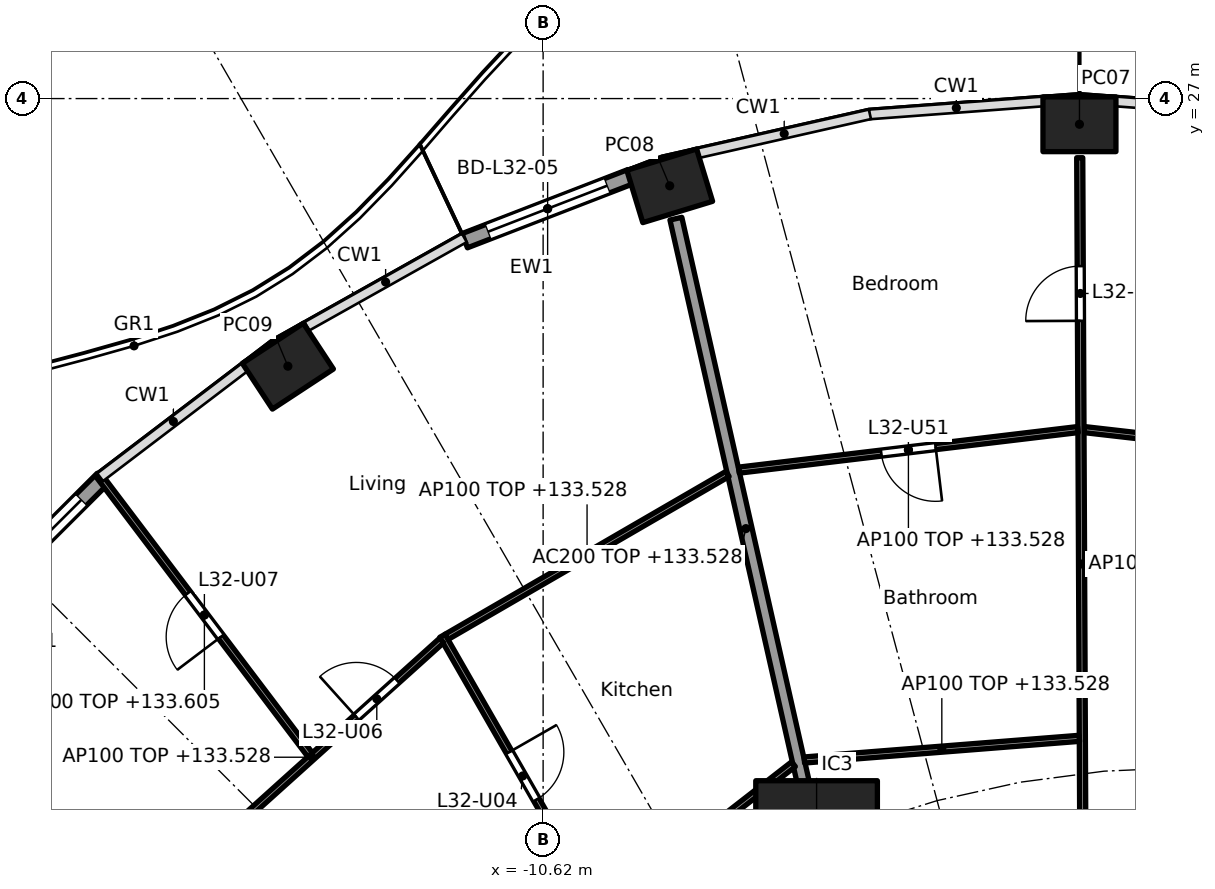
"""IFC4 building model, lengths in metres.
Left out: names, types, materials, properties, quantities, classifications, styles, units other than length and angle.
Written with IfcOpenShell. Run it as: python <this file> out.ifc"""

import sys

from ifc_helpers import new_model, si_unit, direction, frame, frame_2d, origin, origin_2d, place, context, subcontext, project, spatial, rectangle, hollow_rectangle, extrude, element, fill, save


model = new_model("IFC4")
c1 = context("Model", 3, precision=1e-05, world=origin(), true_north=direction((0.0, 1.0)))
c2 = subcontext(c1, "Body", "Model", "MODEL_VIEW")
j1 = project(units=[si_unit("LENGTHUNIT", "METRE"), si_unit("PLANEANGLEUNIT", "RADIAN")], contexts=[c1])
p1 = place(None, origin())
s1 = spatial("IfcSite", under=j1, at=p1, CompositionType="ELEMENT")
p2 = place(p1, origin())
s2 = spatial("IfcBuilding", under=s1, at=p2, CompositionType="ELEMENT")
p3 = place(p2, frame((0.0, 0.0, 130.7)))
s3 = spatial("IfcBuildingStorey", under=s2, at=p3, CompositionType="ELEMENT", Elevation=130.7)
for number, where, z_axis, x_axis in (
    (1, (-1.8, 26.577, 0.0), (0.0, 0.0, 1.0), (-1.0, 0.0, 0.0)),
    (2, (-8.538, 25.565, 0.0), (0.0, 0.0, 1.0), (-0.957, -0.292, 0.0)),
    (3, (-14.817, 22.599, 0.0), (0.0, 0.0, 1.0), (-0.836, -0.549, 0.0)),
):
    element("IfcColumn", number, at=place(p3, frame(where, z_axis=z_axis, x_axis=x_axis)), inside=s3, PredefinedType="COLUMN", context=c2, shape_type="SweptSolid", body=[
        extrude(hollow_rectangle(XDim=1.2, YDim=0.9, WallThickness=0.04, at=origin_2d()), origin(), (0.0, 0.0, 1.0), 3.7),
    ])
p4 = place(p3, frame((-6.123, 14.782, 0.0), z_axis=(0.0, 0.0, 1.0), x_axis=(1.0, 0.0, 0.0)))
e4 = element("IfcColumn", 4, at=p4, inside=s3, PredefinedType="COLUMN", context=c2, shape_type="SweptSolid", body=[
    extrude(rectangle(XDim=2.0, YDim=2.0, at=origin_2d()), origin(), (0.0, 0.0, 1.0), 3.7),
])
p5 = place(p3, frame((-11.909, 24.662, 0.0), z_axis=(0.0, 0.0, 1.0), x_axis=(0.932845344347, 0.360277064952, 0.0)))
e5 = element("IfcWall", 5, at=p5, inside=s3, PredefinedType="SOLIDWALL", context=c2, shape_type="SweptSolid", body=[
    extrude(rectangle(XDim=2.923, YDim=0.25, at=frame_2d((1.462, 0.0))), origin(), (0.0, 0.0, 1.0), 3.44),
])
p6 = place(p5, frame((0.412, 0.0, 0.0)))
e6 = element("IfcOpeningElement", 6, at=p6, cuts=e5, PredefinedType="OPENING", context=c2, shape_type="SweptSolid", body=[
    extrude(rectangle(XDim=2.1, YDim=2.4, at=frame_2d((1.05, 1.2))), frame((0.0, 0.135, 0.0), z_axis=(0.0, -1.0, 0.0), x_axis=(1.0, 0.0, 0.0)), (0.0, 0.0, 1.0), 0.27),
])
p7 = place(p3, frame((-20.05, 18.569, 0.0), z_axis=(0.0, 0.0, 1.0), x_axis=(0.707857823335, 0.706354940482, 0.0)))
e7 = element("IfcWall", 7, at=p7, inside=s3, PredefinedType="SOLIDWALL", context=c2, shape_type="SweptSolid", body=[
    extrude(rectangle(XDim=3.086, YDim=0.25, at=frame_2d((1.543, 0.0))), origin(), (0.0, 0.0, 1.0), 3.44),
])
p8 = place(p7, frame((0.493, 0.0, 0.0)))
e8 = element("IfcOpeningElement", 8, at=p8, cuts=e7, PredefinedType="OPENING", context=c2, shape_type="SweptSolid", body=[
    extrude(rectangle(XDim=2.1, YDim=2.4, at=frame_2d((1.05, 1.2))), frame((0.0, 0.135, 0.0), z_axis=(0.0, -1.0, 0.0), x_axis=(1.0, 0.0, 0.0)), (0.0, 0.0, 1.0), 0.27),
])
p9 = place(p3, frame((-6.134, 14.831, 0.0), z_axis=(0.0, 0.0, 1.0), x_axis=(-0.220337590808, 0.975423675167, 0.0)))
e9 = element("IfcWall", 9, at=p9, inside=s3, PredefinedType="PARTITIONING", context=c2, shape_type="SweptSolid", body=[
    extrude(rectangle(XDim=10.451, YDim=0.2, at=frame_2d((5.226, 0.0))), origin(), (0.0, 0.0, 1.0), 2.828),
])
p10 = place(p3, frame((3.751, 20.93, 0.0), z_axis=(0.0, 0.0, 1.0), x_axis=(-0.993522105273, 0.113639017658, 0.0)))
e10 = element("IfcWall", 10, at=p10, inside=s3, PredefinedType="PARTITIONING", context=c2, shape_type="SweptSolid", body=[
    extrude(rectangle(XDim=5.513, YDim=0.1, at=frame_2d((2.756, 0.0))), origin(), (0.0, 0.0, 1.0), 2.828),
])
p11 = place(p10, frame((2.306, 0.0, 0.0)))
e11 = element("IfcOpeningElement", 11, at=p11, cuts=e10, PredefinedType="OPENING", context=c2, shape_type="SweptSolid", body=[
    extrude(rectangle(XDim=0.9, YDim=2.1, at=frame_2d((0.45, 1.05))), frame((0.0, 0.06, 0.0), z_axis=(0.0, -1.0, 0.0), x_axis=(1.0, 0.0, 0.0)), (0.0, 0.0, 1.0), 0.12),
])
p12 = place(p3, frame((-1.735, 12.665, 0.0), z_axis=(0.0, 0.0, 1.0), x_axis=(-0.004494500855, 0.99998989968, 0.0)))
e12 = element("IfcWall", 12, at=p12, inside=s3, PredefinedType="PARTITIONING", context=c2, shape_type="SweptSolid", body=[
    extrude(rectangle(XDim=13.363, YDim=0.1, at=frame_2d((6.681, 0.0))), origin(), (0.0, 0.0, 1.0), 2.756),
])
p13 = place(p12, frame((1.459, 0.0, 0.0)))
e13 = element("IfcOpeningElement", 13, at=p13, cuts=e12, PredefinedType="OPENING", context=c2, shape_type="SweptSolid", body=[
    extrude(rectangle(XDim=0.9, YDim=2.1, at=frame_2d((0.45, 1.05))), frame((0.0, 0.06, 0.0), z_axis=(0.0, -1.0, 0.0), x_axis=(1.0, 0.0, 0.0)), (0.0, 0.0, 1.0), 0.12),
])
p14 = place(p12, frame((10.68, 0.0, 0.0)))
e14 = element("IfcOpeningElement", 14, at=p14, cuts=e12, PredefinedType="OPENING", context=c2, shape_type="SweptSolid", body=[
    extrude(rectangle(XDim=0.9, YDim=2.1, at=frame_2d((0.45, 1.05))), frame((0.0, 0.06, 0.0), z_axis=(0.0, -1.0, 0.0), x_axis=(1.0, 0.0, 0.0)), (0.0, 0.0, 1.0), 0.12),
])
p15 = place(p3, frame((-1.802, 16.479, 0.0), z_axis=(0.0, 0.0, 1.0), x_axis=(-0.996907698294, -0.078581429625, 0.0)))
e15 = element("IfcWall", 15, at=p15, inside=s3, PredefinedType="PARTITIONING", context=c2, shape_type="SweptSolid", body=[
    extrude(rectangle(XDim=4.536, YDim=0.1, at=frame_2d((2.268, 0.0))), origin(), (0.0, 0.0, 1.0), 2.828),
])
p16 = place(p3, frame((-1.825, 21.557, 0.0), z_axis=(0.0, 0.0, 1.0), x_axis=(-0.992915053711, -0.11882632753, 0.0)))
e16 = element("IfcWall", 16, at=p16, inside=s3, PredefinedType="PARTITIONING", context=c2, shape_type="SweptSolid", body=[
    extrude(rectangle(XDim=5.615, YDim=0.1, at=frame_2d((2.808, 0.0))), origin(), (0.0, 0.0, 1.0), 2.828),
])
p17 = place(p16, frame((2.358, 0.0, 0.0)))
e17 = element("IfcOpeningElement", 17, at=p17, cuts=e16, PredefinedType="OPENING", context=c2, shape_type="SweptSolid", body=[
    extrude(rectangle(XDim=0.9, YDim=2.1, at=frame_2d((0.45, 1.05))), frame((0.0, 0.06, 0.0), z_axis=(0.0, -1.0, 0.0), x_axis=(1.0, 0.0, 0.0)), (0.0, 0.0, 1.0), 0.12),
])
p18 = place(p3, frame((-6.503, 16.054, 0.0), z_axis=(0.0, 0.0, 1.0), x_axis=(-0.789428807693, -0.613842127574, 0.0)))
e18 = element("IfcWall", 18, at=p18, inside=s3, PredefinedType="PARTITIONING", context=c2, shape_type="SweptSolid", body=[
    extrude(rectangle(XDim=3.948, YDim=0.1, at=frame_2d((1.974, 0.0))), origin(), (0.0, 0.0, 1.0), 2.828),
])
p19 = place(p3, frame((-7.586, 20.827, 0.0), z_axis=(0.0, 0.0, 1.0), x_axis=(-0.865093450578, -0.501610727325, 0.0)))
e19 = element("IfcWall", 19, at=p19, inside=s3, PredefinedType="PARTITIONING", context=c2, shape_type="SweptSolid", body=[
    extrude(rectangle(XDim=5.343, YDim=0.1, at=frame_2d((2.671, 0.0))), origin(), (0.0, 0.0, 1.0), 2.828),
])
p20 = place(p3, frame((-7.708, 10.198, 0.0), z_axis=(0.0, 0.0, 1.0), x_axis=(-0.497449462689, 0.867492957937, 0.0)))
e20 = element("IfcWall", 20, at=p20, inside=s3, PredefinedType="PARTITIONING", context=c2, shape_type="SweptSolid", body=[
    extrude(rectangle(XDim=9.185, YDim=0.1, at=frame_2d((4.592, 0.0))), origin(), (0.0, 0.0, 1.0), 2.756),
])
p21 = place(p20, frame((1.511, 0.0, 0.0)))
e21 = element("IfcOpeningElement", 21, at=p21, cuts=e20, PredefinedType="OPENING", context=c2, shape_type="SweptSolid", body=[
    extrude(rectangle(XDim=0.9, YDim=2.1, at=frame_2d((0.45, 1.05))), frame((0.0, 0.06, 0.0), z_axis=(0.0, -1.0, 0.0), x_axis=(1.0, 0.0, 0.0)), (0.0, 0.0, 1.0), 0.12),
])
p22 = place(p20, frame((6.078, 0.0, 0.0)))
e22 = element("IfcOpeningElement", 22, at=p22, cuts=e20, PredefinedType="OPENING", context=c2, shape_type="SweptSolid", body=[
    extrude(rectangle(XDim=0.9, YDim=2.1, at=frame_2d((0.45, 1.05))), frame((0.0, 0.06, 0.0), z_axis=(0.0, -1.0, 0.0), x_axis=(1.0, 0.0, 0.0)), (0.0, 0.0, 1.0), 0.12),
])
p23 = place(p3, frame((-12.289, 18.089, 0.0), z_axis=(0.0, 0.0, 1.0), x_axis=(-0.743146066164, -0.669129228435, 0.0)))
e23 = element("IfcWall", 23, at=p23, inside=s3, PredefinedType="PARTITIONING", context=c2, shape_type="SweptSolid", body=[
    extrude(rectangle(XDim=5.739, YDim=0.1, at=frame_2d((2.87, 0.0))), origin(), (0.0, 0.0, 1.0), 2.828),
])
p24 = place(p23, frame((0.985, 0.0, 0.0)))
e24 = element("IfcOpeningElement", 24, at=p24, cuts=e23, PredefinedType="OPENING", context=c2, shape_type="SweptSolid", body=[
    extrude(rectangle(XDim=0.9, YDim=2.1, at=frame_2d((0.45, 1.05))), frame((0.0, 0.06, 0.0), z_axis=(0.0, -1.0, 0.0), x_axis=(1.0, 0.0, 0.0)), (0.0, 0.0, 1.0), 0.12),
])
p25 = place(p3, frame((-14.452, 16.208, 0.0), z_axis=(0.0, 0.0, 1.0), x_axis=(-0.603267974074, 0.797538557975, 0.0)))
e25 = element("IfcWall", 25, at=p25, inside=s3, PredefinedType="PARTITIONING", context=c2, shape_type="SweptSolid", body=[
    extrude(rectangle(XDim=5.764, YDim=0.1, at=frame_2d((2.882, 0.0))), origin(), (0.0, 0.0, 1.0), 2.905),
])
p26 = place(p25, frame((2.432, 0.0, 0.0)))
e26 = element("IfcOpeningElement", 26, at=p26, cuts=e25, PredefinedType="OPENING", context=c2, shape_type="SweptSolid", body=[
    extrude(rectangle(XDim=0.9, YDim=2.1, at=frame_2d((0.45, 1.05))), frame((0.0, 0.06, 0.0), z_axis=(0.0, -1.0, 0.0), x_axis=(1.0, 0.0, 0.0)), (0.0, 0.0, 1.0), 0.12),
])
p27 = place(p6, origin())
e27 = element("IfcDoor", 27, at=p27, inside=s3, OperationType="SLIDING_TO_LEFT", PredefinedType="DOOR", context=c2, shape_type="SweptSolid", body=[
    extrude(rectangle(XDim=2.1, YDim=2.4, at=frame_2d((1.05, 1.2))), frame((0.0, 0.025, 0.0), z_axis=(0.0, -1.0, 0.0), x_axis=(1.0, 0.0, 0.0)), (0.0, 0.0, 1.0), 0.05),
])
fill(e6, e27)
p28 = place(p8, origin())
e28 = element("IfcDoor", 28, at=p28, inside=s3, OperationType="SLIDING_TO_LEFT", PredefinedType="DOOR", context=c2, shape_type="SweptSolid", body=[
    extrude(rectangle(XDim=2.1, YDim=2.4, at=frame_2d((1.05, 1.2))), frame((0.0, 0.025, 0.0), z_axis=(0.0, -1.0, 0.0), x_axis=(1.0, 0.0, 0.0)), (0.0, 0.0, 1.0), 0.05),
])
fill(e8, e28)
p29 = place(p22, frame((0.9, 0.0, 0.0), x_axis=(-1.0, 0.0, 0.0)))
e29 = element("IfcDoor", 29, at=p29, inside=s3, OperationType="SINGLE_SWING_LEFT", PredefinedType="DOOR", context=c2, shape_type="SweptSolid", body=[
    extrude(rectangle(XDim=0.9, YDim=2.1, at=frame_2d((0.45, 1.05))), frame((0.0, 0.025, 0.0), z_axis=(0.0, -1.0, 0.0), x_axis=(1.0, 0.0, 0.0)), (0.0, 0.0, 1.0), 0.05),
])
fill(e22, e29)
p30 = place(p24, frame((0.9, 0.0, 0.0), x_axis=(-1.0, 0.0, 0.0)))
e30 = element("IfcDoor", 30, at=p30, inside=s3, OperationType="SINGLE_SWING_LEFT", PredefinedType="DOOR", context=c2, shape_type="SweptSolid", body=[
    extrude(rectangle(XDim=0.9, YDim=2.1, at=frame_2d((0.45, 1.05))), frame((0.0, 0.025, 0.0), z_axis=(0.0, -1.0, 0.0), x_axis=(1.0, 0.0, 0.0)), (0.0, 0.0, 1.0), 0.05),
])
fill(e24, e30)
p31 = place(p26, origin())
e31 = element("IfcDoor", 31, at=p31, inside=s3, OperationType="SINGLE_SWING_LEFT", PredefinedType="DOOR", context=c2, shape_type="SweptSolid", body=[
    extrude(rectangle(XDim=0.9, YDim=2.1, at=frame_2d((0.45, 1.05))), frame((0.0, 0.025, 0.0), z_axis=(0.0, -1.0, 0.0), x_axis=(1.0, 0.0, 0.0)), (0.0, 0.0, 1.0), 0.05),
])
fill(e26, e31)
p32 = place(p14, origin())
e32 = element("IfcDoor", 32, at=p32, inside=s3, OperationType="SINGLE_SWING_LEFT", PredefinedType="DOOR", context=c2, shape_type="SweptSolid", body=[
    extrude(rectangle(XDim=0.9, YDim=2.1, at=frame_2d((0.45, 1.05))), frame((0.0, 0.025, 0.0), z_axis=(0.0, -1.0, 0.0), x_axis=(1.0, 0.0, 0.0)), (0.0, 0.0, 1.0), 0.05),
])
fill(e14, e32)
p33 = place(p17, origin())
e33 = element("IfcDoor", 33, at=p33, inside=s3, OperationType="SINGLE_SWING_LEFT", PredefinedType="DOOR", context=c2, shape_type="SweptSolid", body=[
    extrude(rectangle(XDim=0.9, YDim=2.1, at=frame_2d((0.45, 1.05))), frame((0.0, 0.025, 0.0), z_axis=(0.0, -1.0, 0.0), x_axis=(1.0, 0.0, 0.0)), (0.0, 0.0, 1.0), 0.05),
])
fill(e17, e33)
save(model, sys.argv[1])
